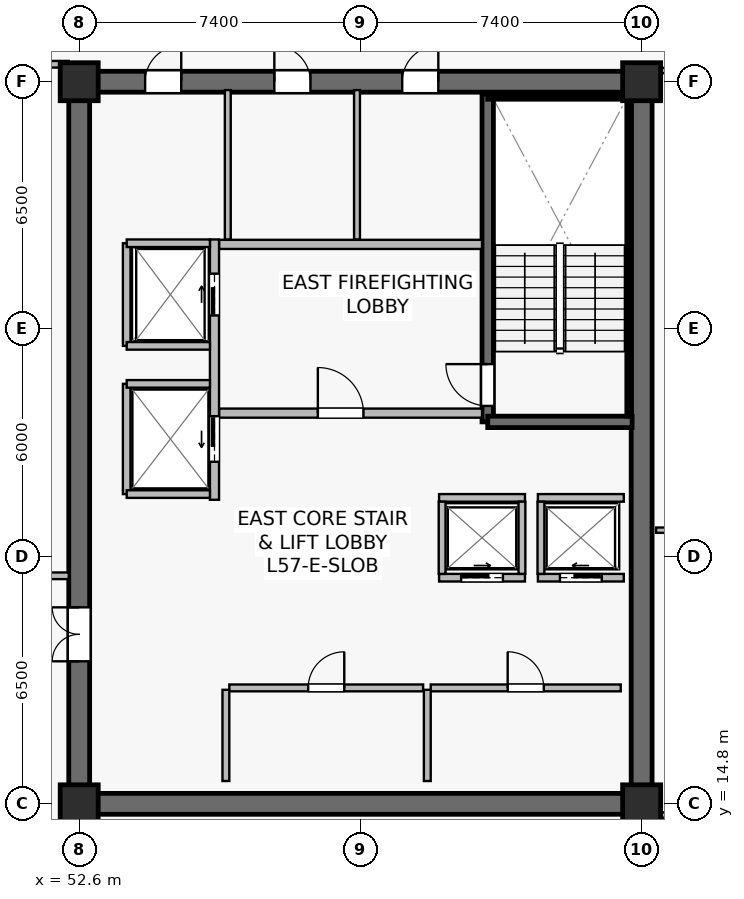
"""IFC4 building model, lengths in metres.
Left out: names, types, materials, properties, quantities, classifications, styles, units other than length and angle.
Written with IfcOpenShell. Run it as: python <this file> out.ifc"""

import sys

from ifc_helpers import new_model, si_unit, direction, frame, frame_2d, origin, origin_2d, place, context, subcontext, project, spatial, rectangle, extrude, source, transform, mapped, element, fill, save


model = new_model("IFC4")
c1 = context("Model", 3, precision=1e-05, world=origin(), true_north=direction((0.0, 1.0)))
c2 = subcontext(c1, "Body", "Model", "MODEL_VIEW")
j1 = project(units=[si_unit("LENGTHUNIT", "METRE"), si_unit("PLANEANGLEUNIT", "RADIAN")], contexts=[c1])
p1 = place(None, origin())
s1 = spatial("IfcSite", under=j1, at=p1, CompositionType="ELEMENT")
p2 = place(p1, origin())
s2 = spatial("IfcBuilding", under=s1, at=p2, CompositionType="ELEMENT")
p3 = place(p2, frame((0.0, 0.0, 238.3)))
s3 = spatial("IfcBuildingStorey", under=s2, at=p3, CompositionType="ELEMENT", Elevation=238.3)
p4 = place(p3, frame((52.325, 14.8, 0.0), z_axis=(0.0, 0.0, 1.0), x_axis=(1.0, 0.0, 0.0)))
e1 = element("IfcWall", 1, at=p4, inside=s3, PredefinedType="SHEAR", context=c2, shape_type="SweptSolid", body=[
    extrude(rectangle(XDim=15.35, YDim=0.55, at=frame_2d((7.675, 0.0))), origin(), (0.0, 0.0, 1.0), 3.8),
])
p5 = place(p3, frame((52.325, 33.8, 0.0), z_axis=(0.0, 0.0, 1.0), x_axis=(1.0, 0.0, 0.0)))
e2 = element("IfcWall", 2, at=p5, inside=s3, PredefinedType="SHEAR", context=c2, shape_type="SweptSolid", body=[
    extrude(rectangle(XDim=15.35, YDim=0.55, at=frame_2d((7.675, 0.0))), origin(), (0.0, 0.0, 1.0), 3.8),
])
p6 = place(p5, frame((8.775, 0.0, 0.0)))
e3 = element("IfcOpeningElement", 3, at=p6, cuts=e2, PredefinedType="OPENING", context=c2, shape_type="SweptSolid", body=[
    extrude(rectangle(XDim=0.95, YDim=2.15, at=frame_2d((0.475, 1.075))), frame((0.0, 0.285, 0.0), z_axis=(0.0, -1.0, 0.0), x_axis=(1.0, 0.0, 0.0)), (0.0, 0.0, 1.0), 0.57),
])
p7 = place(p5, frame((5.41, 0.0, 0.0)))
e4 = element("IfcOpeningElement", 4, at=p7, cuts=e2, PredefinedType="OPENING", context=c2, shape_type="SweptSolid", body=[
    extrude(rectangle(XDim=0.95, YDim=2.15, at=frame_2d((0.475, 1.075))), frame((0.0, 0.285, 0.0), z_axis=(0.0, -1.0, 0.0), x_axis=(1.0, 0.0, 0.0)), (0.0, 0.0, 1.0), 0.57),
])
p8 = place(p5, frame((2.01, 0.0, 0.0)))
e5 = element("IfcOpeningElement", 5, at=p8, cuts=e2, PredefinedType="OPENING", context=c2, shape_type="SweptSolid", body=[
    extrude(rectangle(XDim=0.95, YDim=2.15, at=frame_2d((0.475, 1.075))), frame((0.0, 0.285, 0.0), z_axis=(0.0, -1.0, 0.0), x_axis=(1.0, 0.0, 0.0)), (0.0, 0.0, 1.0), 0.57),
])
p9 = place(p3, frame((52.6, 15.075, 0.0), z_axis=(0.0, 0.0, 1.0), x_axis=(0.0, 1.0, 0.0)))
e6 = element("IfcWall", 6, at=p9, inside=s3, PredefinedType="SHEAR", context=c2, shape_type="SweptSolid", body=[
    extrude(rectangle(XDim=18.45, YDim=0.55, at=frame_2d((9.225, 0.0))), origin(), (0.0, 0.0, 1.0), 3.8),
])
p10 = place(p9, frame((3.475, 0.0, 0.0)))
e7 = element("IfcOpeningElement", 7, at=p10, cuts=e6, PredefinedType="OPENING", context=c2, shape_type="SweptSolid", body=[
    extrude(rectangle(XDim=1.42, YDim=2.2, at=frame_2d((0.71, 1.1))), frame((0.0, 0.285, 0.0), z_axis=(0.0, -1.0, 0.0), x_axis=(1.0, 0.0, 0.0)), (0.0, 0.0, 1.0), 0.57),
])
p11 = place(p3, frame((67.4, 15.075, 0.0), z_axis=(0.0, 0.0, 1.0), x_axis=(0.0, 1.0, 0.0)))
e8 = element("IfcWall", 8, at=p11, inside=s3, PredefinedType="SHEAR", context=c2, shape_type="SweptSolid", body=[
    extrude(rectangle(XDim=18.45, YDim=0.55, at=frame_2d((9.225, 0.0))), origin(), (0.0, 0.0, 1.0), 3.8),
])
p12 = place(p3, frame((63.35, 24.85, 0.0), z_axis=(0.0, 0.0, 1.0), x_axis=(0.0, 1.0, 0.0)))
e9 = element("IfcWall", 9, at=p12, inside=s3, PredefinedType="SHEAR", context=c2, shape_type="SweptSolid", body=[
    extrude(rectangle(XDim=8.63, YDim=0.3, at=frame_2d((4.315, 0.0))), origin(), (0.0, 0.0, 1.0), 3.8),
])
p13 = place(p12, frame((0.42, 0.0, 0.0)))
e10 = element("IfcOpeningElement", 10, at=p13, cuts=e9, PredefinedType="OPENING", context=c2, shape_type="SweptSolid", body=[
    extrude(rectangle(XDim=1.1, YDim=2.15, at=frame_2d((0.55, 1.075))), frame((0.0, 0.16, 0.0), z_axis=(0.0, -1.0, 0.0), x_axis=(1.0, 0.0, 0.0)), (0.0, 0.0, 1.0), 0.32),
])
p14 = place(p3, frame((63.35, 24.85, 0.0), z_axis=(0.0, 0.0, 1.0), x_axis=(1.0, 0.0, 0.0)))
e11 = element("IfcWall", 11, at=p14, inside=s3, PredefinedType="SHEAR", context=c2, shape_type="SweptSolid", body=[
    extrude(rectangle(XDim=3.8, YDim=0.3, at=frame_2d((1.9, 0.0))), origin(), (0.0, 0.0, 1.0), 3.8),
])
p15 = place(p3, frame((63.35, 33.4, 0.0), z_axis=(0.0, 0.0, 1.0), x_axis=(1.0, 0.0, 0.0)))
e12 = element("IfcWall", 12, at=p15, inside=s3, PredefinedType="SOLIDWALL", context=c2, shape_type="SweptSolid", body=[
    extrude(rectangle(XDim=3.72, YDim=0.12, at=frame_2d((1.86, 0.0))), origin(), (0.0, 0.0, 1.0), 3.8),
])
p16 = place(p3, frame((67.07, 25.0, 0.0), z_axis=(0.0, 0.0, 1.0), x_axis=(0.0, 1.0, 0.0)))
e13 = element("IfcWall", 13, at=p16, inside=s3, PredefinedType="SOLIDWALL", context=c2, shape_type="SweptSolid", body=[
    extrude(rectangle(XDim=8.32, YDim=0.12, at=frame_2d((4.16, 0.0))), origin(), (0.0, 0.0, 1.0), 3.8),
])
m1 = source(origin(), c2, "Body", "SweptSolid", [
    extrude(rectangle(XDim=1.0, YDim=1.0, at=origin_2d()), origin(), (0.0, 0.0, 1.0), 4.1),
])
for number, where, z_axis, x_axis in (
    (14, (52.6, 14.8, 0.0), (0.0, 0.0, 1.0), (1.0, 0.0, 0.0)),
    (15, (67.4, 14.8, 0.0), (0.0, 0.0, 1.0), (1.0, 0.0, 0.0)),
    (16, (52.6, 33.8, 0.0), (0.0, 0.0, 1.0), (1.0, 0.0, 0.0)),
    (17, (67.4, 33.8, 0.0), (0.0, 0.0, 1.0), (1.0, 0.0, 0.0)),
):
    element("IfcColumn", number, at=place(p3, frame(where, z_axis=z_axis, x_axis=x_axis)), inside=s3, PredefinedType="COLUMN", context=c2, shape_type="MappedRepresentation", body=[
        mapped(m1, transform((0.0, 0.0, 0.0), scale=1.0)),
    ])
p17 = place(p3, frame((56.28, 25.08, 0.0), z_axis=(0.0, 0.0, 1.0), x_axis=(1.0, 0.0, 0.0)))
e18 = element("IfcWall", 18, at=p17, inside=s3, PredefinedType="SOLIDWALL", context=c2, shape_type="SweptSolid", body=[
    extrude(rectangle(XDim=6.92, YDim=0.24, at=frame_2d((3.46, 0.0))), origin(), (0.0, 0.0, 1.0), 3.197),
])
p18 = place(p17, frame((2.6, 0.0, 0.0)))
e19 = element("IfcOpeningElement", 19, at=p18, cuts=e18, PredefinedType="OPENING", context=c2, shape_type="SweptSolid", body=[
    extrude(rectangle(XDim=1.2, YDim=2.16, at=frame_2d((0.6, 1.08))), frame((0.0, 0.13, 0.0), z_axis=(0.0, -1.0, 0.0), x_axis=(1.0, 0.0, 0.0)), (0.0, 0.0, 1.0), 0.26),
])
p19 = place(p3, frame((56.28, 29.52, 0.0), z_axis=(0.0, 0.0, 1.0), x_axis=(1.0, 0.0, 0.0)))
e20 = element("IfcWall", 20, at=p19, inside=s3, PredefinedType="SOLIDWALL", context=c2, shape_type="SweptSolid", body=[
    extrude(rectangle(XDim=6.92, YDim=0.24, at=frame_2d((3.46, 0.0))), origin(), (0.0, 0.0, 1.0), 3.197),
])
p20 = place(p3, frame((56.16, 22.8, 0.0), z_axis=(0.0, 0.0, 1.0), x_axis=(0.0, 1.0, 0.0)))
e21 = element("IfcWall", 21, at=p20, inside=s3, PredefinedType="SOLIDWALL", context=c2, shape_type="SweptSolid", body=[
    extrude(rectangle(XDim=6.85, YDim=0.24, at=frame_2d((3.425, 0.0))), origin(), (0.0, 0.0, 1.0), 2.935),
])
p21 = place(p20, frame((4.85, 0.0, 0.0)))
e22 = element("IfcOpeningElement", 22, at=p21, cuts=e21, PredefinedType="OPENING", context=c2, shape_type="SweptSolid", body=[
    extrude(rectangle(XDim=1.1, YDim=2.22, at=frame_2d((0.55, 1.11))), frame((0.0, 0.13, 0.0), z_axis=(0.0, -1.0, 0.0), x_axis=(1.0, 0.0, 0.0)), (0.0, 0.0, 1.0), 0.26),
])
p22 = place(p20, frame((1.0, 0.0, 0.0)))
e23 = element("IfcOpeningElement", 23, at=p22, cuts=e21, PredefinedType="OPENING", context=c2, shape_type="SweptSolid", body=[
    extrude(rectangle(XDim=1.2, YDim=2.22, at=frame_2d((0.6, 1.11))), frame((0.0, 0.13, 0.0), z_axis=(0.0, -1.0, 0.0), x_axis=(1.0, 0.0, 0.0)), (0.0, 0.0, 1.0), 0.26),
])
p23 = place(p3, frame((64.67, 20.75, 0.0), z_axis=(0.0, 0.0, 1.0), x_axis=(1.0, 0.0, 0.0)))
e24 = element("IfcWall", 24, at=p23, inside=s3, PredefinedType="SOLIDWALL", context=c2, shape_type="SweptSolid", body=[
    extrude(rectangle(XDim=2.26, YDim=0.2, at=frame_2d((1.13, 0.0))), origin(), (0.0, 0.0, 1.0), 3.8),
])
p24 = place(p23, frame((0.58, 0.0, 0.0)))
e25 = element("IfcOpeningElement", 25, at=p24, cuts=e24, PredefinedType="OPENING", context=c2, shape_type="SweptSolid", body=[
    extrude(rectangle(XDim=1.1, YDim=2.22, at=frame_2d((0.55, 1.11))), frame((0.0, 0.11, 0.0), z_axis=(0.0, -1.0, 0.0), x_axis=(1.0, 0.0, 0.0)), (0.0, 0.0, 1.0), 0.22),
])
p25 = place(p3, frame((64.67, 22.85, 0.0), z_axis=(0.0, 0.0, 1.0), x_axis=(1.0, 0.0, 0.0)))
e26 = element("IfcWall", 26, at=p25, inside=s3, PredefinedType="SOLIDWALL", context=c2, shape_type="SweptSolid", body=[
    extrude(rectangle(XDim=2.26, YDim=0.2, at=frame_2d((1.13, 0.0))), origin(), (0.0, 0.0, 1.0), 3.8),
])
p26 = place(p3, frame((64.75, 20.85, 0.0), z_axis=(0.0, 0.0, 1.0), x_axis=(0.0, 1.0, 0.0)))
e27 = element("IfcWall", 27, at=p26, inside=s3, PredefinedType="SOLIDWALL", context=c2, shape_type="SweptSolid", body=[
    extrude(rectangle(XDim=1.9, YDim=0.18, at=frame_2d((0.95, 0.0))), origin(), (0.0, 0.0, 1.0), 3.8),
])
p27 = place(p3, frame((62.07, 20.75, 0.0), z_axis=(0.0, 0.0, 1.0), x_axis=(1.0, 0.0, 0.0)))
e28 = element("IfcWall", 28, at=p27, inside=s3, PredefinedType="SOLIDWALL", context=c2, shape_type="SweptSolid", body=[
    extrude(rectangle(XDim=2.26, YDim=0.2, at=frame_2d((1.13, 0.0))), origin(), (0.0, 0.0, 1.0), 3.8),
])
p28 = place(p27, frame((0.58, 0.0, 0.0)))
e29 = element("IfcOpeningElement", 29, at=p28, cuts=e28, PredefinedType="OPENING", context=c2, shape_type="SweptSolid", body=[
    extrude(rectangle(XDim=1.1, YDim=2.22, at=frame_2d((0.55, 1.11))), frame((0.0, 0.11, 0.0), z_axis=(0.0, -1.0, 0.0), x_axis=(1.0, 0.0, 0.0)), (0.0, 0.0, 1.0), 0.22),
])
p29 = place(p3, frame((62.07, 22.85, 0.0), z_axis=(0.0, 0.0, 1.0), x_axis=(1.0, 0.0, 0.0)))
e30 = element("IfcWall", 30, at=p29, inside=s3, PredefinedType="SOLIDWALL", context=c2, shape_type="SweptSolid", body=[
    extrude(rectangle(XDim=2.26, YDim=0.2, at=frame_2d((1.13, 0.0))), origin(), (0.0, 0.0, 1.0), 3.8),
])
for number, where, z_axis, x_axis in (
    (31, (62.15, 20.85, 0.0), (0.0, 0.0, 1.0), (0.0, 1.0, 0.0)),
    (32, (64.25, 20.85, 0.0), (0.0, 0.0, 1.0), (0.0, 1.0, 0.0)),
):
    element("IfcWall", number, at=place(p3, frame(where, z_axis=z_axis, x_axis=x_axis)), inside=s3, PredefinedType="SOLIDWALL", context=c2, shape_type="SweptSolid", body=[
        extrude(rectangle(XDim=1.9, YDim=0.18, at=frame_2d((0.95, 0.0))), origin(), (0.0, 0.0, 1.0), 3.8),
    ])
p30 = place(p3, frame((53.85, 26.85, 0.0), z_axis=(0.0, 0.0, 1.0), x_axis=(0.0, 1.0, 0.0)))
e33 = element("IfcWall", 33, at=p30, inside=s3, PredefinedType="SOLIDWALL", context=c2, shape_type="SweptSolid", body=[
    extrude(rectangle(XDim=2.7, YDim=0.2, at=frame_2d((1.35, 0.0))), origin(), (0.0, 0.0, 1.0), 3.8),
])
p31 = place(p3, frame((53.85, 29.55, 0.0), z_axis=(0.0, 0.0, 1.0), x_axis=(1.0, 0.0, 0.0)))
e34 = element("IfcWall", 34, at=p31, inside=s3, PredefinedType="SOLIDWALL", context=c2, shape_type="SweptSolid", body=[
    extrude(rectangle(XDim=2.19, YDim=0.2, at=frame_2d((1.095, 0.0))), origin(), (0.0, 0.0, 1.0), 3.8),
])
p32 = place(p3, frame((53.85, 26.85, 0.0), z_axis=(0.0, 0.0, 1.0), x_axis=(1.0, 0.0, 0.0)))
e35 = element("IfcWall", 35, at=p32, inside=s3, PredefinedType="SOLIDWALL", context=c2, shape_type="SweptSolid", body=[
    extrude(rectangle(XDim=2.19, YDim=0.2, at=frame_2d((1.095, 0.0))), origin(), (0.0, 0.0, 1.0), 3.197),
])
p33 = place(p3, frame((53.85, 22.95, 0.0), z_axis=(0.0, 0.0, 1.0), x_axis=(0.0, 1.0, 0.0)))
e36 = element("IfcWall", 36, at=p33, inside=s3, PredefinedType="SOLIDWALL", context=c2, shape_type="SweptSolid", body=[
    extrude(rectangle(XDim=2.9, YDim=0.2, at=frame_2d((1.45, 0.0))), origin(), (0.0, 0.0, 1.0), 2.935),
])
for number, where, z_axis, x_axis in (
    (37, (53.85, 25.85, 0.0), (0.0, 0.0, 1.0), (1.0, 0.0, 0.0)),
    (38, (53.85, 22.95, 0.0), (0.0, 0.0, 1.0), (1.0, 0.0, 0.0)),
):
    element("IfcWall", number, at=place(p3, frame(where, z_axis=z_axis, x_axis=x_axis)), inside=s3, PredefinedType="SOLIDWALL", context=c2, shape_type="SweptSolid", body=[
        extrude(rectangle(XDim=2.19, YDim=0.2, at=frame_2d((1.095, 0.0))), origin(), (0.0, 0.0, 1.0), 3.8),
    ])
p34 = place(p3, frame((61.85, 17.85, 0.0), z_axis=(0.0, 0.0, 1.0), x_axis=(1.0, 0.0, 0.0)))
e39 = element("IfcWall", 39, at=p34, inside=s3, PredefinedType="SOLIDWALL", context=c2, shape_type="SweptSolid", body=[
    extrude(rectangle(XDim=5.0, YDim=0.18, at=frame_2d((2.5, 0.0))), origin(), (0.0, 0.0, 1.0), 3.8),
])
p35 = place(p34, frame((2.025, 0.0, 0.0)))
e40 = element("IfcOpeningElement", 40, at=p35, cuts=e39, PredefinedType="OPENING", context=c2, shape_type="SweptSolid", body=[
    extrude(rectangle(XDim=0.95, YDim=2.15, at=frame_2d((0.475, 1.075))), frame((0.0, 0.1, 0.0), z_axis=(0.0, -1.0, 0.0), x_axis=(1.0, 0.0, 0.0)), (0.0, 0.0, 1.0), 0.2),
])
p36 = place(p3, frame((61.76, 15.4, 0.0), z_axis=(0.0, 0.0, 1.0), x_axis=(0.0, 1.0, 0.0)))
e41 = element("IfcWall", 41, at=p36, inside=s3, PredefinedType="SOLIDWALL", context=c2, shape_type="SweptSolid", body=[
    extrude(rectangle(XDim=2.4, YDim=0.18, at=frame_2d((1.2, 0.0))), origin(), (0.0, 0.0, 1.0), 3.8),
])
p37 = place(p3, frame((56.55, 17.85, 0.0), z_axis=(0.0, 0.0, 1.0), x_axis=(1.0, 0.0, 0.0)))
e42 = element("IfcWall", 42, at=p37, inside=s3, PredefinedType="SOLIDWALL", context=c2, shape_type="SweptSolid", body=[
    extrude(rectangle(XDim=5.1, YDim=0.18, at=frame_2d((2.55, 0.0))), origin(), (0.0, 0.0, 1.0), 3.197),
])
p38 = place(p37, frame((2.075, 0.0, 0.0)))
e43 = element("IfcOpeningElement", 43, at=p38, cuts=e42, PredefinedType="OPENING", context=c2, shape_type="SweptSolid", body=[
    extrude(rectangle(XDim=0.95, YDim=2.15, at=frame_2d((0.475, 1.075))), frame((0.0, 0.1, 0.0), z_axis=(0.0, -1.0, 0.0), x_axis=(1.0, 0.0, 0.0)), (0.0, 0.0, 1.0), 0.2),
])
p39 = place(p3, frame((56.46, 15.4, 0.0), z_axis=(0.0, 0.0, 1.0), x_axis=(0.0, 1.0, 0.0)))
e44 = element("IfcWall", 44, at=p39, inside=s3, PredefinedType="SOLIDWALL", context=c2, shape_type="SweptSolid", body=[
    extrude(rectangle(XDim=2.4, YDim=0.18, at=frame_2d((1.2, 0.0))), origin(), (0.0, 0.0, 1.0), 3.8),
])
p40 = place(p3, frame((59.91, 29.65, 0.0), z_axis=(0.0, 0.0, 1.0), x_axis=(0.0, 1.0, 0.0)))
e45 = element("IfcWall", 45, at=p40, inside=s3, PredefinedType="PLUMBINGWALL", context=c2, shape_type="SweptSolid", body=[
    extrude(rectangle(XDim=3.93, YDim=0.155, at=frame_2d((1.965, 0.0))), origin(), (0.0, 0.0, 1.0), 3.197),
])
p41 = place(p3, frame((56.51, 29.65, 0.0), z_axis=(0.0, 0.0, 1.0), x_axis=(0.0, 1.0, 0.0)))
e46 = element("IfcWall", 46, at=p41, inside=s3, PredefinedType="PLUMBINGWALL", context=c2, shape_type="SweptSolid", body=[
    extrude(rectangle(XDim=3.93, YDim=0.155, at=frame_2d((1.965, 0.0))), origin(), (0.0, 0.0, 1.0), 3.8),
])
p42 = place(p3, frame((48.3, 34.26, 0.0), z_axis=(0.0, 0.0, 1.0), x_axis=(1.0, 0.0, 0.0)))
e47 = element("IfcWall", 47, at=p42, inside=s3, PredefinedType="PARTITIONING", context=c2, shape_type="SweptSolid", body=[
    extrude(rectangle(XDim=4.025, YDim=0.175, at=frame_2d((2.012, 0.0))), origin(), (0.0, 0.0, 1.0), 3.485),
])
p43 = place(p3, frame((48.3, 20.8, 0.0), z_axis=(0.0, 0.0, 1.0), x_axis=(1.0, 0.0, 0.0)))
e48 = element("IfcWall", 48, at=p43, inside=s3, PredefinedType="PARTITIONING", context=c2, shape_type="SweptSolid", body=[
    extrude(rectangle(XDim=4.025, YDim=0.175, at=frame_2d((2.012, 0.0))), origin(), (0.0, 0.0, 1.0), 3.8),
])
p44 = place(p43, frame((1.35, 0.0, 0.0)))
e49 = element("IfcOpeningElement", 49, at=p44, cuts=e48, PredefinedType="OPENING", context=c2, shape_type="SweptSolid", body=[
    extrude(rectangle(XDim=0.95, YDim=2.15, at=frame_2d((0.475, 1.075))), frame((0.0, 0.098, 0.0), z_axis=(0.0, -1.0, 0.0), x_axis=(1.0, 0.0, 0.0)), (0.0, 0.0, 1.0), 0.195),
])
p45 = place(p3, frame((67.78, 22.0, 0.0), z_axis=(0.0, 0.0, 1.0), x_axis=(1.0, 0.0, 0.0)))
e50 = element("IfcWall", 50, at=p45, inside=s3, PredefinedType="PARTITIONING", context=c2, shape_type="SweptSolid", body=[
    extrude(rectangle(XDim=2.91, YDim=0.14, at=frame_2d((1.455, 0.0))), origin(), (0.0, 0.0, 1.0), 3.8),
])
p46 = place(p3, frame((67.78, 14.505, 0.0), z_axis=(0.0, 0.0, 1.0), x_axis=(1.0, 0.0, 0.0)))
e51 = element("IfcWall", 51, at=p46, inside=s3, PredefinedType="PARTITIONING", context=c2, shape_type="SweptSolid", body=[
    extrude(rectangle(XDim=2.91, YDim=0.14, at=frame_2d((1.455, 0.0))), origin(), (0.0, 0.0, 1.0), 3.8),
])
p47 = place(p46, frame((1.005, 0.0, 0.0)))
e52 = element("IfcOpeningElement", 52, at=p47, cuts=e51, PredefinedType="OPENING", context=c2, shape_type="SweptSolid", body=[
    extrude(rectangle(XDim=0.9, YDim=2.1, at=frame_2d((0.45, 1.05))), frame((0.0, 0.08, 0.0), z_axis=(0.0, -1.0, 0.0), x_axis=(1.0, 0.0, 0.0)), (0.0, 0.0, 1.0), 0.16),
])
p48 = place(p3, frame((67.78, 34.095, 0.0), z_axis=(0.0, 0.0, 1.0), x_axis=(1.0, 0.0, 0.0)))
e53 = element("IfcWall", 53, at=p48, inside=s3, PredefinedType="PARTITIONING", context=c2, shape_type="SweptSolid", body=[
    extrude(rectangle(XDim=2.91, YDim=0.14, at=frame_2d((1.455, 0.0))), origin(), (0.0, 0.0, 1.0), 3.8),
])
p49 = place(p48, frame((1.005, 0.0, 0.0)))
e54 = element("IfcOpeningElement", 54, at=p49, cuts=e53, PredefinedType="OPENING", context=c2, shape_type="SweptSolid", body=[
    extrude(rectangle(XDim=0.9, YDim=2.1, at=frame_2d((0.45, 1.05))), frame((0.0, 0.08, 0.0), z_axis=(0.0, -1.0, 0.0), x_axis=(1.0, 0.0, 0.0)), (0.0, 0.0, 1.0), 0.16),
])
m2 = source(origin(), c2, "Body", "SweptSolid", [
    extrude(rectangle(XDim=1.1, YDim=2.15, at=frame_2d((0.55, 1.075))), frame((0.0, 0.025, 0.0), z_axis=(0.0, -1.0, 0.0), x_axis=(1.0, 0.0, 0.0)), (0.0, 0.0, 1.0), 0.05),
])
p50 = place(p13, origin())
e55 = element("IfcDoor", 55, at=p50, inside=s3, OperationType="SINGLE_SWING_RIGHT", PredefinedType="DOOR", context=c2, shape_type="MappedRepresentation", body=[
    mapped(m2, transform((0.0, 0.0, 0.0), scale=1.0)),
])
fill(e10, e55)
m3 = source(origin(), c2, "Body", "SweptSolid", [
    extrude(rectangle(XDim=1.2, YDim=2.16, at=frame_2d((0.6, 1.08))), frame((0.0, 0.025, 0.0), z_axis=(0.0, -1.0, 0.0), x_axis=(1.0, 0.0, 0.0)), (0.0, 0.0, 1.0), 0.05),
])
p51 = place(p18, origin())
e56 = element("IfcDoor", 56, at=p51, inside=s3, OperationType="SINGLE_SWING_LEFT", PredefinedType="DOOR", context=c2, shape_type="MappedRepresentation", body=[
    mapped(m3, transform((0.0, 0.0, 0.0), scale=1.0)),
])
fill(e19, e56)
m4 = source(origin(), c2, "Body", "SweptSolid", [
    extrude(rectangle(XDim=1.1, YDim=2.22, at=frame_2d((0.55, 1.11))), frame((0.0, 0.025, 0.0), z_axis=(0.0, -1.0, 0.0), x_axis=(1.0, 0.0, 0.0)), (0.0, 0.0, 1.0), 0.05),
])
p52 = place(p24, origin())
e57 = element("IfcDoor", 57, at=p52, inside=s3, OperationType="SLIDING_TO_LEFT", PredefinedType="USERDEFINED", context=c2, shape_type="MappedRepresentation", body=[
    mapped(m4, transform((0.0, 0.0, 0.0), scale=1.0)),
])
fill(e25, e57)
p53 = place(p28, origin())
e58 = element("IfcDoor", 58, at=p53, inside=s3, OperationType="SLIDING_TO_RIGHT", PredefinedType="USERDEFINED", context=c2, shape_type="MappedRepresentation", body=[
    mapped(m4, transform((0.0, 0.0, 0.0), scale=1.0)),
])
fill(e29, e58)
p54 = place(p21, origin())
e59 = element("IfcDoor", 59, at=p54, inside=s3, OperationType="SLIDING_TO_RIGHT", PredefinedType="USERDEFINED", context=c2, shape_type="MappedRepresentation", body=[
    mapped(m4, transform((0.0, 0.0, 0.0), scale=1.0)),
])
fill(e22, e59)
m5 = source(origin(), c2, "Body", "SweptSolid", [
    extrude(rectangle(XDim=1.2, YDim=2.22, at=frame_2d((0.6, 1.11))), frame((0.0, 0.025, 0.0), z_axis=(0.0, -1.0, 0.0), x_axis=(1.0, 0.0, 0.0)), (0.0, 0.0, 1.0), 0.05),
])
p55 = place(p22, origin())
e60 = element("IfcDoor", 60, at=p55, inside=s3, OperationType="SLIDING_TO_LEFT", PredefinedType="USERDEFINED", context=c2, shape_type="MappedRepresentation", body=[
    mapped(m5, transform((0.0, 0.0, 0.0), scale=1.0)),
])
fill(e23, e60)
m6 = source(origin(), c2, "Body", "SweptSolid", [
    extrude(rectangle(XDim=0.95, YDim=2.15, at=frame_2d((0.475, 1.075))), frame((0.0, 0.025, 0.0), z_axis=(0.0, -1.0, 0.0), x_axis=(1.0, 0.0, 0.0)), (0.0, 0.0, 1.0), 0.05),
])
p56 = place(p35, origin())
e61 = element("IfcDoor", 61, at=p56, inside=s3, OperationType="SINGLE_SWING_LEFT", PredefinedType="DOOR", context=c2, shape_type="MappedRepresentation", body=[
    mapped(m6, transform((0.0, 0.0, 0.0), scale=1.0)),
])
fill(e40, e61)
p57 = place(p38, origin())
e62 = element("IfcDoor", 62, at=p57, inside=s3, OperationType="SINGLE_SWING_RIGHT", PredefinedType="DOOR", context=c2, shape_type="MappedRepresentation", body=[
    mapped(m6, transform((0.0, 0.0, 0.0), scale=1.0)),
])
fill(e43, e62)
m7 = source(origin(), c2, "Body", "SweptSolid", [
    extrude(rectangle(XDim=1.42, YDim=2.2, at=frame_2d((0.71, 1.1))), frame((0.0, 0.025, 0.0), z_axis=(0.0, -1.0, 0.0), x_axis=(1.0, 0.0, 0.0)), (0.0, 0.0, 1.0), 0.05),
])
p58 = place(p10, origin())
e63 = element("IfcDoor", 63, at=p58, inside=s3, OperationType="DOUBLE_DOOR_SINGLE_SWING", PredefinedType="DOOR", context=c2, shape_type="MappedRepresentation", body=[
    mapped(m7, transform((0.0, 0.0, 0.0), scale=1.0)),
])
fill(e7, e63)
p59 = place(p6, origin())
e64 = element("IfcDoor", 64, at=p59, inside=s3, OperationType="SINGLE_SWING_RIGHT", PredefinedType="DOOR", context=c2, shape_type="MappedRepresentation", body=[
    mapped(m6, transform((0.0, 0.0, 0.0), scale=1.0)),
])
fill(e3, e64)
p60 = place(p7, origin())
e65 = element("IfcDoor", 65, at=p60, inside=s3, OperationType="SINGLE_SWING_LEFT", PredefinedType="DOOR", context=c2, shape_type="MappedRepresentation", body=[
    mapped(m6, transform((0.0, 0.0, 0.0), scale=1.0)),
])
fill(e4, e65)
p61 = place(p8, origin())
e66 = element("IfcDoor", 66, at=p61, inside=s3, OperationType="SINGLE_SWING_RIGHT", PredefinedType="DOOR", context=c2, shape_type="MappedRepresentation", body=[
    mapped(m6, transform((0.0, 0.0, 0.0), scale=1.0)),
])
fill(e5, e66)
save(model, sys.argv[1])
